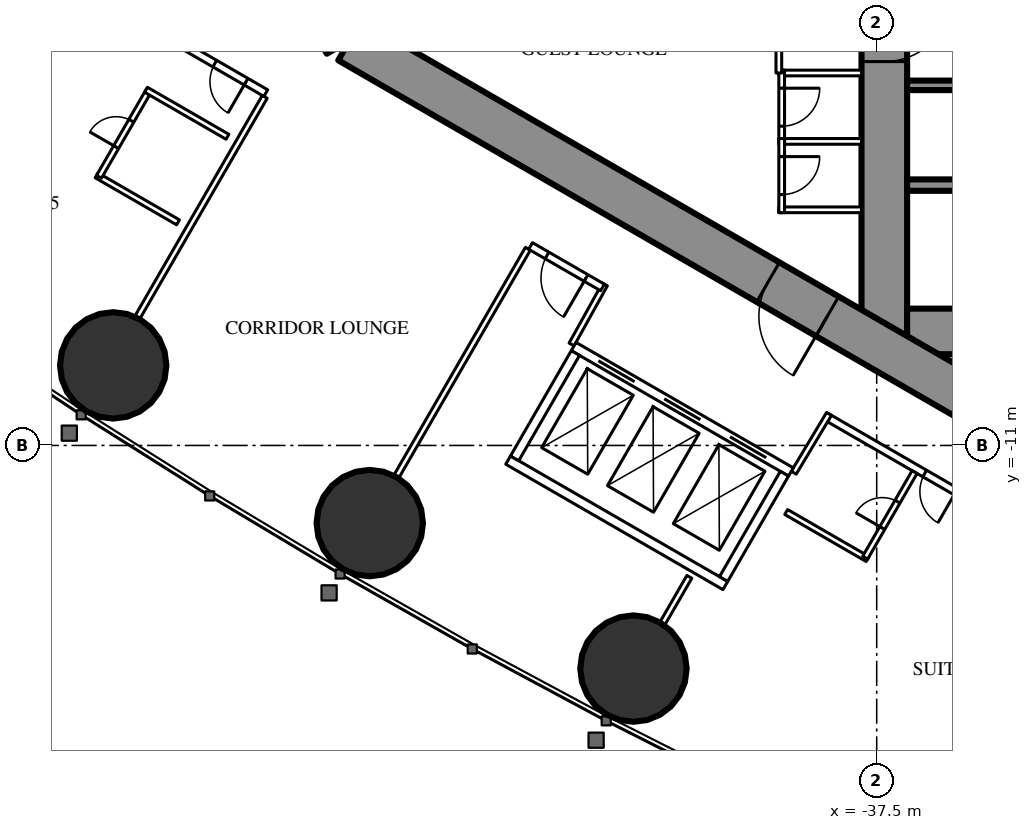
"""IFC4 building model, lengths in metres.
Left out: names, types, materials, properties, quantities, classifications, styles, units other than length and angle.
Written with IfcOpenShell. Run it as: python <this file> out.ifc"""

import sys

from ifc_helpers import new_model, si_unit, direction, frame, frame_2d, origin, origin_2d, place, context, subcontext, project, spatial, rectangle, circle, extrude, element, fill, save


model = new_model("IFC4")
c1 = context("Model", 3, precision=1e-05, world=origin(), true_north=direction((0.0, 1.0)))
c2 = subcontext(c1, "Body", "Model", "MODEL_VIEW")
j1 = project(units=[si_unit("LENGTHUNIT", "METRE"), si_unit("PLANEANGLEUNIT", "RADIAN")], contexts=[c1])
p1 = place(None, origin())
s1 = spatial("IfcSite", under=j1, at=p1, CompositionType="ELEMENT")
p2 = place(p1, origin())
s2 = spatial("IfcBuilding", under=s1, at=p2, CompositionType="ELEMENT")
p3 = place(p2, frame((0.0, 0.0, 198.3)))
s3 = spatial("IfcBuildingStorey", under=s2, at=p3, CompositionType="ELEMENT", Elevation=198.3)
for number, where, z_axis, x_axis in (
    (1, (-57.59, -8.893, 0.0), (0.0, 0.0, 1.0), (1.0, 0.0, 0.0)),
    (2, (-50.839, -13.043, 0.0), (0.0, 0.0, 1.0), (1.0, 0.0, 0.0)),
    (3, (-43.9, -16.871, 0.0), (0.0, 0.0, 1.0), (1.0, 0.0, 0.0)),
):
    element("IfcColumn", number, at=place(p3, frame(where, z_axis=z_axis, x_axis=x_axis)), inside=s3, PredefinedType="COLUMN", context=c2, shape_type="SweptSolid", body=[
        extrude(circle(Radius=1.4, at=origin_2d()), origin(), (0.0, 0.0, 1.0), 3.5),
    ])
p4 = place(p3, frame((-37.3, 8.6, 0.0), z_axis=(0.0, 0.0, 1.0), x_axis=(0.0, -1.0, 0.0)))
e4 = element("IfcWall", 4, at=p4, inside=s3, PredefinedType="SHEAR", context=c2, shape_type="SweptSolid", body=[
    extrude(rectangle(XDim=17.2, YDim=1.2, at=frame_2d((8.6, 0.0))), origin(), (0.0, 0.0, 1.0), 3.5),
])
p5 = place(p4, frame((7.7, 0.0, 0.0)))
e5 = element("IfcOpeningElement", 5, at=p5, cuts=e4, PredefinedType="OPENING", context=c2, shape_type="SweptSolid", body=[
    extrude(rectangle(XDim=1.8, YDim=2.2, at=frame_2d((0.9, 1.1))), frame((0.0, 0.61, 0.0), z_axis=(0.0, -1.0, 0.0), x_axis=(1.0, 0.0, 0.0)), (0.0, 0.0, 1.0), 1.22),
])
p6 = place(p3, frame((-28.3, -8.0, 0.0), z_axis=(0.0, 0.0, 1.0), x_axis=(-1.0, 0.0, 0.0)))
e6 = element("IfcWall", 6, at=p6, inside=s3, PredefinedType="SHEAR", context=c2, shape_type="SweptSolid", body=[
    extrude(rectangle(XDim=8.4, YDim=1.2, at=frame_2d((4.2, 0.0))), origin(), (0.0, 0.0, 1.0), 3.5),
])
p7 = place(p6, frame((0.25, 0.0, 0.0)))
e7 = element("IfcOpeningElement", 7, at=p7, cuts=e6, PredefinedType="OPENING", context=c2, shape_type="SweptSolid", body=[
    extrude(rectangle(XDim=1.0, YDim=2.2, at=frame_2d((0.5, 1.1))), frame((0.0, 0.61, 0.0), z_axis=(0.0, -1.0, 0.0), x_axis=(1.0, 0.0, 0.0)), (0.0, 0.0, 1.0), 1.22),
])
p8 = place(p3, frame((-28.3, -4.15, 0.0), z_axis=(0.0, 0.0, 1.0), x_axis=(-1.0, 0.0, 0.0)))
e8 = element("IfcWall", 8, at=p8, inside=s3, PredefinedType="SHEAR", context=c2, shape_type="SweptSolid", body=[
    extrude(rectangle(XDim=8.4, YDim=0.3, at=frame_2d((4.2, 0.0))), origin(), (0.0, 0.0, 1.0), 3.5),
])
p9 = place(p3, frame((-34.25, -1.525, 0.0), z_axis=(0.0, 0.0, 1.0), x_axis=(-1.0, 0.0, 0.0)))
e9 = element("IfcWall", 9, at=p9, inside=s3, PredefinedType="SHEAR", context=c2, shape_type="SweptSolid", body=[
    extrude(rectangle(XDim=2.45, YDim=0.25, at=frame_2d((1.225, 0.0))), origin(), (0.0, 0.0, 1.0), 3.5),
])
p10 = place(p3, frame((-27.2, 14.3, 0.0), z_axis=(0.0, 0.0, 1.0), x_axis=(-0.866026593062, -0.499997940104, 0.0)))
e10 = element("IfcWall", 10, at=p10, inside=s3, PredefinedType="SHEAR", context=c2, shape_type="SweptSolid", body=[
    extrude(rectangle(XDim=28.946, YDim=1.2, at=frame_2d((14.473, 0.0))), origin(), (0.0, 0.0, 1.0), 3.5),
])
p11 = place(p10, frame((4.6, 0.0, 0.0)))
e11 = element("IfcOpeningElement", 11, at=p11, cuts=e10, PredefinedType="OPENING", context=c2, shape_type="SweptSolid", body=[
    extrude(rectangle(XDim=1.0, YDim=2.2, at=frame_2d((0.5, 1.1))), frame((0.0, 0.61, 0.0), z_axis=(0.0, -1.0, 0.0), x_axis=(1.0, 0.0, 0.0)), (0.0, 0.0, 1.0), 1.22),
])
p12 = place(p10, frame((13.395, 0.0, 0.0)))
e12 = element("IfcOpeningElement", 12, at=p12, cuts=e10, PredefinedType="OPENING", context=c2, shape_type="SweptSolid", body=[
    extrude(rectangle(XDim=1.8, YDim=2.2, at=frame_2d((0.9, 1.1))), frame((0.0, 0.61, 0.0), z_axis=(0.0, -1.0, 0.0), x_axis=(1.0, 0.0, 0.0)), (0.0, 0.0, 1.0), 1.22),
])
p13 = place(p3, frame((-27.2, -14.3, 0.0), z_axis=(0.0, 0.0, 1.0), x_axis=(-0.866024021859, 0.500002393557, 0.0)))
e13 = element("IfcWall", 13, at=p13, inside=s3, PredefinedType="SHEAR", context=c2, shape_type="SweptSolid", body=[
    extrude(rectangle(XDim=27.907, YDim=1.2, at=frame_2d((13.954, 0.0))), origin(), (0.0, 0.0, 1.0), 3.5),
])
p14 = place(p13, frame((4.6, 0.0, 0.0)))
e14 = element("IfcOpeningElement", 14, at=p14, cuts=e13, PredefinedType="OPENING", context=c2, shape_type="SweptSolid", body=[
    extrude(rectangle(XDim=1.0, YDim=2.2, at=frame_2d((0.5, 1.1))), frame((0.0, 0.61, 0.0), z_axis=(0.0, -1.0, 0.0), x_axis=(1.0, 0.0, 0.0)), (0.0, 0.0, 1.0), 1.22),
])
p15 = place(p13, frame((13.395, 0.0, 0.0)))
e15 = element("IfcOpeningElement", 15, at=p15, cuts=e13, PredefinedType="OPENING", context=c2, shape_type="SweptSolid", body=[
    extrude(rectangle(XDim=1.8, YDim=2.2, at=frame_2d((0.9, 1.1))), frame((0.0, 0.61, 0.0), z_axis=(0.0, -1.0, 0.0), x_axis=(1.0, 0.0, 0.0)), (0.0, 0.0, 1.0), 1.22),
])
p16 = place(p3, frame((-46.679, -5.825, 0.0), z_axis=(0.0, 0.0, 1.0), x_axis=(-0.500006839597, -0.866021454905, 0.0)))
e16 = element("IfcWall", 16, at=p16, inside=s3, PredefinedType="PARTITIONING", context=c2, shape_type="SweptSolid", body=[
    extrude(rectangle(XDim=6.911, YDim=0.15, at=frame_2d((3.456, 0.0))), origin(), (0.0, 0.0, 1.0), 2.3),
])
p17 = place(p3, frame((-53.602, -1.828, 0.0), z_axis=(0.0, 0.0, 1.0), x_axis=(-0.49999191814, -0.866030069798, 0.0)))
e17 = element("IfcWall", 17, at=p17, inside=s3, PredefinedType="PARTITIONING", context=c2, shape_type="SweptSolid", body=[
    extrude(rectangle(XDim=6.692, YDim=0.15, at=frame_2d((3.346, 0.0))), origin(), (0.0, 0.0, 1.0), 2.3),
])
p18 = place(p3, frame((-42.429, -14.457, 0.0), z_axis=(0.0, 0.0, 1.0), x_axis=(-0.5000578829, -0.865991982497, 0.0)))
e18 = element("IfcWall", 18, at=p18, inside=s3, PredefinedType="PARTITIONING", context=c2, shape_type="SweptSolid", body=[
    extrude(rectangle(XDim=1.407, YDim=0.15, at=frame_2d((0.704, 0.0))), origin(), (0.0, 0.0, 1.0), 3.25),
])
p19 = place(p3, frame((-27.86, -16.575, 0.0), z_axis=(0.0, 0.0, 1.0), x_axis=(-0.866027756871, 0.499995924312, 0.0)))
e19 = element("IfcWall", 19, at=p19, inside=s3, PredefinedType="PARTITIONING", context=c2, shape_type="SweptSolid", body=[
    extrude(rectangle(XDim=12.622, YDim=0.2, at=frame_2d((6.311, 0.0))), origin(), (0.0, 0.0, 1.0), 3.25),
])
p20 = place(p19, frame((8.722, 0.0, 0.0)))
e20 = element("IfcOpeningElement", 20, at=p20, cuts=e19, PredefinedType="OPENING", context=c2, shape_type="SweptSolid", body=[
    extrude(rectangle(XDim=0.95, YDim=2.2, at=frame_2d((0.475, 1.1))), frame((0.0, 0.11, 0.0), z_axis=(0.0, -1.0, 0.0), x_axis=(1.0, 0.0, 0.0)), (0.0, 0.0, 1.0), 0.22),
])
for number, where, z_axis, x_axis in (
    (21, (-39.683, -11.718, 0.0), (0.0, 0.0, 1.0), (0.514, 0.858, 0.0)),
    (22, (-44.652, -6.764, 0.0), (0.0, 0.0, 1.0), (-0.485, -0.874, 0.0)),
):
    element("IfcWall", number, at=place(p3, frame(where, z_axis=z_axis, x_axis=x_axis)), inside=s3, PredefinedType="PARTITIONING", context=c2, shape_type="SweptSolid", body=[
        extrude(rectangle(XDim=1.805, YDim=0.15, at=frame_2d((0.903, 0.0))), origin(), (0.0, 0.0, 1.0), 3.25),
    ])
p21 = place(p3, frame((-44.715, -6.844, 0.0), z_axis=(0.0, 0.0, 1.0), x_axis=(-0.865999496279, 0.500044870432, 0.0)))
e23 = element("IfcWall", 23, at=p21, inside=s3, PredefinedType="PARTITIONING", context=c2, shape_type="SweptSolid", body=[
    extrude(rectangle(XDim=2.185, YDim=0.2, at=frame_2d((1.092, 0.0))), origin(), (0.0, 0.0, 1.0), 3.25),
])
p22 = place(p21, frame((0.5, 0.0, 0.0)))
e24 = element("IfcOpeningElement", 24, at=p22, cuts=e23, PredefinedType="OPENING", context=c2, shape_type="SweptSolid", body=[
    extrude(rectangle(XDim=1.185, YDim=2.2, at=frame_2d((0.593, 1.1))), frame((0.0, 0.11, 0.0), z_axis=(0.0, -1.0, 0.0), x_axis=(1.0, 0.0, 0.0)), (0.0, 0.0, 1.0), 0.22),
])
p23 = place(p3, frame((-53.574, -1.729, 0.0), z_axis=(0.0, 0.0, 1.0), x_axis=(-0.866019930389, 0.500009480079, 0.0)))
e25 = element("IfcWall", 25, at=p23, inside=s3, PredefinedType="PARTITIONING", context=c2, shape_type="SweptSolid", body=[
    extrude(rectangle(XDim=3.338, YDim=0.2, at=frame_2d((1.669, 0.0))), origin(), (0.0, 0.0, 1.0), 3.25),
])
p24 = place(p23, frame((0.6, 0.0, 0.0)))
e26 = element("IfcOpeningElement", 26, at=p24, cuts=e25, PredefinedType="OPENING", context=c2, shape_type="SweptSolid", body=[
    extrude(rectangle(XDim=0.95, YDim=2.2, at=frame_2d((0.475, 1.1))), frame((0.0, 0.11, 0.0), z_axis=(0.0, -1.0, 0.0), x_axis=(1.0, 0.0, 0.0)), (0.0, 0.0, 1.0), 0.22),
])
p25 = place(p3, frame((-55.884, -5.13, 0.0), z_axis=(0.0, 0.0, 1.0), x_axis=(-0.866006523861, 0.500032699561, 0.0)))
e27 = element("IfcWall", 27, at=p25, inside=s3, PredefinedType="PARTITIONING", context=c2, shape_type="SweptSolid", body=[
    extrude(rectangle(XDim=2.475, YDim=0.15, at=frame_2d((1.237, 0.0))), origin(), (0.0, 0.0, 1.0), 3.25),
])
p26 = place(p3, frame((-56.662, -1.678, 0.0), z_axis=(0.0, 0.0, 1.0), x_axis=(-0.500006934395, -0.866021400173, 0.0)))
e28 = element("IfcWall", 28, at=p26, inside=s3, PredefinedType="PARTITIONING", context=c2, shape_type="SweptSolid", body=[
    extrude(rectangle(XDim=2.6, YDim=0.15, at=frame_2d((1.3, 0.0))), origin(), (0.0, 0.0, 1.0), 3.25),
])
p27 = place(p26, frame((0.9, 0.0, 0.0)))
e29 = element("IfcOpeningElement", 29, at=p27, cuts=e28, PredefinedType="OPENING", context=c2, shape_type="SweptSolid", body=[
    extrude(rectangle(XDim=0.8, YDim=2.2, at=frame_2d((0.4, 1.1))), frame((0.0, 0.085, 0.0), z_axis=(0.0, -1.0, 0.0), x_axis=(1.0, 0.0, 0.0)), (0.0, 0.0, 1.0), 0.17),
])
for number, where, z_axis, x_axis in (
    (30, (-54.583, -2.878, 0.0), (0.0, 0.0, 1.0), (-0.866, 0.5, 0.0)),
    (31, (-37.738, -13.989, 0.0), (0.0, 0.0, 1.0), (-0.866, 0.5, 0.0)),
):
    element("IfcWall", number, at=place(p3, frame(where, z_axis=z_axis, x_axis=x_axis)), inside=s3, PredefinedType="PARTITIONING", context=c2, shape_type="SweptSolid", body=[
        extrude(rectangle(XDim=2.475, YDim=0.15, at=frame_2d((1.237, 0.0))), origin(), (0.0, 0.0, 1.0), 3.25),
    ])
p28 = place(p3, frame((-36.503, -11.7, 0.0), z_axis=(0.0, 0.0, 1.0), x_axis=(-0.500006934395, -0.866021400173, 0.0)))
e32 = element("IfcWall", 32, at=p28, inside=s3, PredefinedType="PARTITIONING", context=c2, shape_type="SweptSolid", body=[
    extrude(rectangle(XDim=2.6, YDim=0.15, at=frame_2d((1.3, 0.0))), origin(), (0.0, 0.0, 1.0), 3.25),
])
p29 = place(p28, frame((0.9, 0.0, 0.0)))
e33 = element("IfcOpeningElement", 33, at=p29, cuts=e32, PredefinedType="OPENING", context=c2, shape_type="SweptSolid", body=[
    extrude(rectangle(XDim=0.8, YDim=2.2, at=frame_2d((0.4, 1.1))), frame((0.0, 0.085, 0.0), z_axis=(0.0, -1.0, 0.0), x_axis=(1.0, 0.0, 0.0)), (0.0, 0.0, 1.0), 0.17),
])
for number, where, z_axis, x_axis in (
    (34, (-37.9, -1.2, 0.0), (0.0, 0.0, 1.0), (-1.0, 0.0, 0.0)),
    (35, (-37.9, -3.0, 0.0), (0.0, 0.0, 1.0), (-1.0, 0.0, 0.0)),
    (36, (-37.9, -4.8, 0.0), (0.0, 0.0, 1.0), (-1.0, 0.0, 0.0)),
):
    element("IfcWall", number, at=place(p3, frame(where, z_axis=z_axis, x_axis=x_axis)), inside=s3, PredefinedType="PARTITIONING", context=c2, shape_type="SweptSolid", body=[
        extrude(rectangle(XDim=2.175, YDim=0.15, at=frame_2d((1.087, 0.0))), origin(), (0.0, 0.0, 1.0), 3.25),
    ])
p30 = place(p3, frame((-40.0, -1.125, 0.0), z_axis=(0.0, 0.0, 1.0), x_axis=(0.0, -1.0, 0.0)))
e37 = element("IfcWall", 37, at=p30, inside=s3, PredefinedType="PARTITIONING", context=c2, shape_type="SweptSolid", body=[
    extrude(rectangle(XDim=1.95, YDim=0.15, at=frame_2d((0.975, 0.0))), origin(), (0.0, 0.0, 1.0), 3.25),
])
p31 = place(p30, frame((0.475, 0.0, 0.0)))
e38 = element("IfcOpeningElement", 38, at=p31, cuts=e37, PredefinedType="OPENING", context=c2, shape_type="SweptSolid", body=[
    extrude(rectangle(XDim=1.0, YDim=2.2, at=frame_2d((0.5, 1.1))), frame((0.0, 0.085, 0.0), z_axis=(0.0, -1.0, 0.0), x_axis=(1.0, 0.0, 0.0)), (0.0, 0.0, 1.0), 0.17),
])
p32 = place(p3, frame((-40.0, -2.925, 0.0), z_axis=(0.0, 0.0, 1.0), x_axis=(0.0, -1.0, 0.0)))
e39 = element("IfcWall", 39, at=p32, inside=s3, PredefinedType="PARTITIONING", context=c2, shape_type="SweptSolid", body=[
    extrude(rectangle(XDim=1.95, YDim=0.15, at=frame_2d((0.975, 0.0))), origin(), (0.0, 0.0, 1.0), 3.25),
])
p33 = place(p32, frame((0.475, 0.0, 0.0)))
e40 = element("IfcOpeningElement", 40, at=p33, cuts=e39, PredefinedType="OPENING", context=c2, shape_type="SweptSolid", body=[
    extrude(rectangle(XDim=1.0, YDim=2.2, at=frame_2d((0.5, 1.1))), frame((0.0, 0.085, 0.0), z_axis=(0.0, -1.0, 0.0), x_axis=(1.0, 0.0, 0.0)), (0.0, 0.0, 1.0), 0.17),
])
p34 = place(p3, frame((-40.075, 6.174, 0.0), z_axis=(0.0, 0.0, 1.0), x_axis=(0.0, -1.0, 0.0)))
e41 = element("IfcWall", 41, at=p34, inside=s3, PredefinedType="PARTITIONING", context=c2, shape_type="SweptSolid", body=[
    extrude(rectangle(XDim=7.374, YDim=0.15, at=frame_2d((3.687, 0.0))), origin(), (0.0, 0.0, 1.0), 3.25),
])
p35 = place(p34, frame((2.787, 0.0, 0.0)))
e42 = element("IfcOpeningElement", 42, at=p35, cuts=e41, PredefinedType="OPENING", context=c2, shape_type="SweptSolid", body=[
    extrude(rectangle(XDim=1.8, YDim=2.2, at=frame_2d((0.9, 1.1))), frame((0.0, 0.085, 0.0), z_axis=(0.0, -1.0, 0.0), x_axis=(1.0, 0.0, 0.0)), (0.0, 0.0, 1.0), 0.17),
])
p36 = place(p3, frame((-39.758, -11.697, 0.0), z_axis=(0.0, 0.0, 1.0), x_axis=(-0.866024194504, 0.500002094529, 0.0)))
e43 = element("IfcWall", 43, at=p36, inside=s3, PredefinedType="PARTITIONING", context=c2, shape_type="SweptSolid", body=[
    extrude(rectangle(XDim=6.6, YDim=0.25, at=frame_2d((3.3, 0.0))), origin(), (0.0, 0.0, 1.0), 3.25),
])
p37 = place(p36, frame((0.75, 0.0, 0.0)))
e44 = element("IfcOpeningElement", 44, at=p37, cuts=e43, PredefinedType="OPENING", context=c2, shape_type="SweptSolid", body=[
    extrude(rectangle(XDim=1.1, YDim=2.2, at=frame_2d((0.55, 1.1))), frame((0.0, 0.135, 0.0), z_axis=(0.0, -1.0, 0.0), x_axis=(1.0, 0.0, 0.0)), (0.0, 0.0, 1.0), 0.27),
])
p38 = place(p36, frame((2.75, 0.0, 0.0)))
e45 = element("IfcOpeningElement", 45, at=p38, cuts=e43, PredefinedType="OPENING", context=c2, shape_type="SweptSolid", body=[
    extrude(rectangle(XDim=1.1, YDim=2.2, at=frame_2d((0.55, 1.1))), frame((0.0, 0.135, 0.0), z_axis=(0.0, -1.0, 0.0), x_axis=(1.0, 0.0, 0.0)), (0.0, 0.0, 1.0), 0.27),
])
p39 = place(p36, frame((4.75, 0.0, 0.0)))
e46 = element("IfcOpeningElement", 46, at=p39, cuts=e43, PredefinedType="OPENING", context=c2, shape_type="SweptSolid", body=[
    extrude(rectangle(XDim=1.1, YDim=2.2, at=frame_2d((0.55, 1.1))), frame((0.0, 0.135, 0.0), z_axis=(0.0, -1.0, 0.0), x_axis=(1.0, 0.0, 0.0)), (0.0, 0.0, 1.0), 0.27),
])
p40 = place(p3, frame((-41.482, -14.686, 0.0), z_axis=(0.0, 0.0, 1.0), x_axis=(-0.86603344179, 0.499986077507, 0.0)))
e47 = element("IfcWall", 47, at=p40, inside=s3, PredefinedType="PARTITIONING", context=c2, shape_type="SweptSolid", body=[
    extrude(rectangle(XDim=6.6, YDim=0.25, at=frame_2d((3.3, 0.0))), origin(), (0.0, 0.0, 1.0), 3.25),
])
for number, where, z_axis, x_axis in (
    (48, (-39.928, -11.743, 0.0), (0.0, 0.0, 1.0), (-0.5, -0.866, 0.0)),
    (49, (-45.428, -8.568, 0.0), (0.0, 0.0, 1.0), (-0.5, -0.866, 0.0)),
):
    element("IfcWall", number, at=place(p3, frame(where, z_axis=z_axis, x_axis=x_axis)), inside=s3, PredefinedType="PARTITIONING", context=c2, shape_type="SweptSolid", body=[
        extrude(rectangle(XDim=3.201, YDim=0.25, at=frame_2d((1.6, 0.0))), origin(), (0.0, 0.0, 1.0), 3.25),
    ])
p41 = place(p27, origin())
e50 = element("IfcDoor", 50, at=p41, inside=s3, OperationType="SINGLE_SWING_RIGHT", PredefinedType="DOOR", context=c2, shape_type="SweptSolid", body=[
    extrude(rectangle(XDim=0.8, YDim=2.2, at=frame_2d((0.4, 1.1))), frame((0.0, 0.025, 0.0), z_axis=(0.0, -1.0, 0.0), x_axis=(1.0, 0.0, 0.0)), (0.0, 0.0, 1.0), 0.05),
])
fill(e29, e50)
p42 = place(p24, origin())
e51 = element("IfcDoor", 51, at=p42, inside=s3, OperationType="SINGLE_SWING_LEFT", PredefinedType="DOOR", context=c2, shape_type="SweptSolid", body=[
    extrude(rectangle(XDim=0.95, YDim=2.2, at=frame_2d((0.475, 1.1))), frame((0.0, 0.025, 0.0), z_axis=(0.0, -1.0, 0.0), x_axis=(1.0, 0.0, 0.0)), (0.0, 0.0, 1.0), 0.05),
])
fill(e26, e51)
p43 = place(p29, origin())
e52 = element("IfcDoor", 52, at=p43, inside=s3, OperationType="SINGLE_SWING_RIGHT", PredefinedType="DOOR", context=c2, shape_type="SweptSolid", body=[
    extrude(rectangle(XDim=0.8, YDim=2.2, at=frame_2d((0.4, 1.1))), frame((0.0, 0.025, 0.0), z_axis=(0.0, -1.0, 0.0), x_axis=(1.0, 0.0, 0.0)), (0.0, 0.0, 1.0), 0.05),
])
fill(e33, e52)
p44 = place(p20, origin())
e53 = element("IfcDoor", 53, at=p44, inside=s3, OperationType="SINGLE_SWING_LEFT", PredefinedType="DOOR", context=c2, shape_type="SweptSolid", body=[
    extrude(rectangle(XDim=0.95, YDim=2.2, at=frame_2d((0.475, 1.1))), frame((0.0, 0.025, 0.0), z_axis=(0.0, -1.0, 0.0), x_axis=(1.0, 0.0, 0.0)), (0.0, 0.0, 1.0), 0.05),
])
fill(e20, e53)
p45 = place(p22, origin())
e54 = element("IfcDoor", 54, at=p45, inside=s3, OperationType="SINGLE_SWING_LEFT", PredefinedType="DOOR", context=c2, shape_type="SweptSolid", body=[
    extrude(rectangle(XDim=1.185, YDim=2.2, at=frame_2d((0.593, 1.1))), frame((0.0, 0.025, 0.0), z_axis=(0.0, -1.0, 0.0), x_axis=(1.0, 0.0, 0.0)), (0.0, 0.0, 1.0), 0.05),
])
fill(e24, e54)
p46 = place(p31, origin())
e55 = element("IfcDoor", 55, at=p46, inside=s3, OperationType="SINGLE_SWING_LEFT", PredefinedType="DOOR", context=c2, shape_type="SweptSolid", body=[
    extrude(rectangle(XDim=1.0, YDim=2.2, at=frame_2d((0.5, 1.1))), frame((0.0, 0.025, 0.0), z_axis=(0.0, -1.0, 0.0), x_axis=(1.0, 0.0, 0.0)), (0.0, 0.0, 1.0), 0.05),
])
fill(e38, e55)
p47 = place(p33, origin())
e56 = element("IfcDoor", 56, at=p47, inside=s3, OperationType="SINGLE_SWING_LEFT", PredefinedType="DOOR", context=c2, shape_type="SweptSolid", body=[
    extrude(rectangle(XDim=1.0, YDim=2.2, at=frame_2d((0.5, 1.1))), frame((0.0, 0.025, 0.0), z_axis=(0.0, -1.0, 0.0), x_axis=(1.0, 0.0, 0.0)), (0.0, 0.0, 1.0), 0.05),
])
fill(e40, e56)
p48 = place(p15, origin())
e57 = element("IfcDoor", 57, at=p48, inside=s3, OperationType="DOUBLE_DOOR_SINGLE_SWING", PredefinedType="DOOR", context=c2, shape_type="SweptSolid", body=[
    extrude(rectangle(XDim=1.8, YDim=2.2, at=frame_2d((0.9, 1.1))), frame((0.0, 0.025, 0.0), z_axis=(0.0, -1.0, 0.0), x_axis=(1.0, 0.0, 0.0)), (0.0, 0.0, 1.0), 0.05),
])
fill(e15, e57)
p49 = place(p5, origin())
e58 = element("IfcDoor", 58, at=p49, inside=s3, OperationType="DOUBLE_DOOR_SINGLE_SWING", PredefinedType="DOOR", context=c2, shape_type="SweptSolid", body=[
    extrude(rectangle(XDim=1.8, YDim=2.2, at=frame_2d((0.9, 1.1))), frame((0.0, 0.025, 0.0), z_axis=(0.0, -1.0, 0.0), x_axis=(1.0, 0.0, 0.0)), (0.0, 0.0, 1.0), 0.05),
])
fill(e5, e58)
p50 = place(p37, origin())
e59 = element("IfcDoor", 59, at=p50, inside=s3, OperationType="DOUBLE_DOOR_SLIDING", PredefinedType="USERDEFINED", context=c2, shape_type="SweptSolid", body=[
    extrude(rectangle(XDim=1.1, YDim=2.2, at=frame_2d((0.55, 1.1))), frame((0.0, 0.025, 0.0), z_axis=(0.0, -1.0, 0.0), x_axis=(1.0, 0.0, 0.0)), (0.0, 0.0, 1.0), 0.05),
])
fill(e44, e59)
p51 = place(p38, origin())
e60 = element("IfcDoor", 60, at=p51, inside=s3, OperationType="DOUBLE_DOOR_SLIDING", PredefinedType="USERDEFINED", context=c2, shape_type="SweptSolid", body=[
    extrude(rectangle(XDim=1.1, YDim=2.2, at=frame_2d((0.55, 1.1))), frame((0.0, 0.025, 0.0), z_axis=(0.0, -1.0, 0.0), x_axis=(1.0, 0.0, 0.0)), (0.0, 0.0, 1.0), 0.05),
])
fill(e45, e60)
p52 = place(p39, origin())
e61 = element("IfcDoor", 61, at=p52, inside=s3, OperationType="DOUBLE_DOOR_SLIDING", PredefinedType="USERDEFINED", context=c2, shape_type="SweptSolid", body=[
    extrude(rectangle(XDim=1.1, YDim=2.2, at=frame_2d((0.55, 1.1))), frame((0.0, 0.025, 0.0), z_axis=(0.0, -1.0, 0.0), x_axis=(1.0, 0.0, 0.0)), (0.0, 0.0, 1.0), 0.05),
])
fill(e46, e61)
save(model, sys.argv[1])
